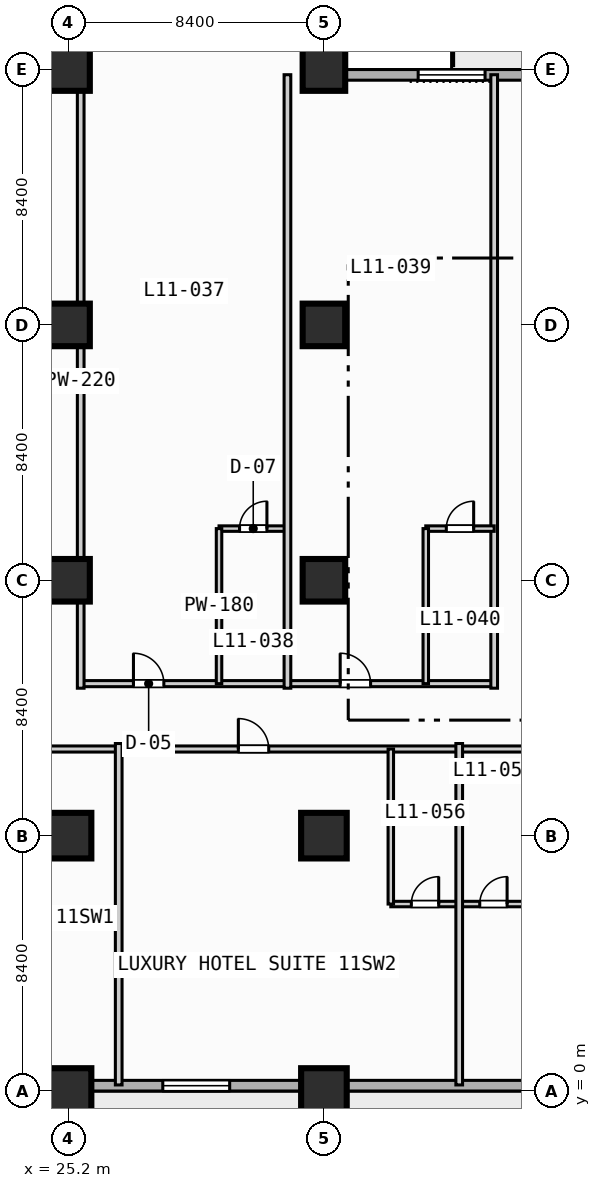
"""IFC4 building model, lengths in metres.
Left out: names, types, materials, properties, quantities, classifications, styles, units other than length and angle.
Written with IfcOpenShell. Run it as: python <this file> out.ifc"""

import sys

from ifc_helpers import new_model, si_unit, direction, frame, frame_2d, origin, origin_2d, place, context, subcontext, project, spatial, rectangle, extrude, element, fill, save


model = new_model("IFC4")
c1 = context("Model", 3, precision=1e-05, world=origin(), true_north=direction((0.0, 1.0)))
c2 = subcontext(c1, "Body", "Model", "MODEL_VIEW")
j1 = project(units=[si_unit("LENGTHUNIT", "METRE"), si_unit("PLANEANGLEUNIT", "RADIAN")], contexts=[c1])
p1 = place(None, origin())
s1 = spatial("IfcSite", under=j1, at=p1, CompositionType="ELEMENT")
p2 = place(p1, origin())
s2 = spatial("IfcBuilding", under=s1, at=p2, CompositionType="ELEMENT")
p3 = place(p2, frame((0.0, 0.0, 51.0)))
s3 = spatial("IfcBuildingStorey", under=s2, at=p3, CompositionType="ELEMENT", Elevation=51.0)
for number, where, z_axis, x_axis in (
    (1, (25.2, 0.0, 0.0), (0.0, 0.0, 1.0), (1.0, 0.0, 0.0)),
    (2, (25.2, 8.4, 0.0), (0.0, 0.0, 1.0), (1.0, 0.0, 0.0)),
):
    element("IfcColumn", number, at=place(p3, frame(where, z_axis=z_axis, x_axis=x_axis)), inside=s3, PredefinedType="COLUMN", context=c2, shape_type="SweptSolid", body=[
        extrude(rectangle(XDim=1.5, YDim=1.5, at=origin_2d()), origin(), (0.0, 0.0, 1.0), 3.8),
    ])
for number, where, z_axis, x_axis in (
    (3, (25.2, 16.8, 0.0), (0.0, 0.0, 1.0), (1.0, 0.0, 0.0)),
    (4, (25.2, 25.2, 0.0), (0.0, 0.0, 1.0), (1.0, 0.0, 0.0)),
    (5, (25.2, 33.6, 0.0), (0.0, 0.0, 1.0), (1.0, 0.0, 0.0)),
):
    element("IfcColumn", number, at=place(p3, frame(where, z_axis=z_axis, x_axis=x_axis)), inside=s3, PredefinedType="COLUMN", context=c2, shape_type="SweptSolid", body=[
        extrude(rectangle(XDim=1.4, YDim=1.4, at=origin_2d()), origin(), (0.0, 0.0, 1.0), 3.8),
    ])
for number, where, z_axis, x_axis in (
    (6, (33.6, 0.0, 0.0), (0.0, 0.0, 1.0), (1.0, 0.0, 0.0)),
    (7, (33.6, 8.4, 0.0), (0.0, 0.0, 1.0), (1.0, 0.0, 0.0)),
):
    element("IfcColumn", number, at=place(p3, frame(where, z_axis=z_axis, x_axis=x_axis)), inside=s3, PredefinedType="COLUMN", context=c2, shape_type="SweptSolid", body=[
        extrude(rectangle(XDim=1.5, YDim=1.5, at=origin_2d()), origin(), (0.0, 0.0, 1.0), 3.8),
    ])
for number, where, z_axis, x_axis in (
    (8, (33.6, 16.8, 0.0), (0.0, 0.0, 1.0), (1.0, 0.0, 0.0)),
    (9, (33.6, 25.2, 0.0), (0.0, 0.0, 1.0), (1.0, 0.0, 0.0)),
    (10, (33.6, 33.6, 0.0), (0.0, 0.0, 1.0), (1.0, 0.0, 0.0)),
):
    element("IfcColumn", number, at=place(p3, frame(where, z_axis=z_axis, x_axis=x_axis)), inside=s3, PredefinedType="COLUMN", context=c2, shape_type="SweptSolid", body=[
        extrude(rectangle(XDim=1.4, YDim=1.4, at=origin_2d()), origin(), (0.0, 0.0, 1.0), 3.8),
    ])
p4 = place(p3, frame((33.425, 89.225, 0.0), z_axis=(0.0, 0.0, 1.0), x_axis=(0.0, -1.0, 0.0)))
e11 = element("IfcWall", 11, at=p4, inside=s3, PredefinedType="STANDARD", context=c2, shape_type="SweptSolid", body=[
    extrude(rectangle(XDim=55.8, YDim=0.35, at=frame_2d((27.9, 0.0))), origin(), (0.0, 0.0, 1.0), 3.55),
])
p5 = place(p4, frame((16.725, 0.0, 0.85)))
e12 = element("IfcOpeningElement", 12, at=p5, cuts=e11, PredefinedType="OPENING", context=c2, shape_type="SweptSolid", body=[
    extrude(rectangle(XDim=2.2, YDim=1.8, at=frame_2d((1.1, 0.9))), frame((0.0, 0.185, 0.0), z_axis=(0.0, -1.0, 0.0), x_axis=(1.0, 0.0, 0.0)), (0.0, 0.0, 1.0), 0.37),
])
p6 = place(p4, frame((8.325, 0.0, 0.85)))
e13 = element("IfcOpeningElement", 13, at=p6, cuts=e11, PredefinedType="OPENING", context=c2, shape_type="SweptSolid", body=[
    extrude(rectangle(XDim=2.2, YDim=1.8, at=frame_2d((1.1, 0.9))), frame((0.0, 0.185, 0.0), z_axis=(0.0, -1.0, 0.0), x_axis=(1.0, 0.0, 0.0)), (0.0, 0.0, 1.0), 0.37),
])
p7 = place(p3, frame((33.425, 33.425, 0.0), z_axis=(0.0, 0.0, 1.0), x_axis=(1.0, 0.0, 0.0)))
e14 = element("IfcWall", 14, at=p7, inside=s3, PredefinedType="STANDARD", context=c2, shape_type="SweptSolid", body=[
    extrude(rectangle(XDim=55.8, YDim=0.35, at=frame_2d((27.9, 0.0))), origin(), (0.0, 0.0, 1.0), 3.55),
])
p8 = place(p7, frame((12.075, 0.0, 0.0)))
e15 = element("IfcOpeningElement", 15, at=p8, cuts=e14, PredefinedType="OPENING", context=c2, shape_type="SweptSolid", body=[
    extrude(rectangle(XDim=1.4, YDim=2.2, at=frame_2d((0.7, 1.1))), frame((0.0, 0.185, 0.0), z_axis=(0.0, -1.0, 0.0), x_axis=(1.0, 0.0, 0.0)), (0.0, 0.0, 1.0), 0.37),
])
p9 = place(p7, frame((3.275, 0.0, 0.85)))
e16 = element("IfcOpeningElement", 16, at=p9, cuts=e14, PredefinedType="OPENING", context=c2, shape_type="SweptSolid", body=[
    extrude(rectangle(XDim=2.2, YDim=1.8, at=frame_2d((1.1, 0.9))), frame((0.0, 0.185, 0.0), z_axis=(0.0, -1.0, 0.0), x_axis=(1.0, 0.0, 0.0)), (0.0, 0.0, 1.0), 0.37),
])
p10 = place(p3, frame((89.225, 0.175, 0.0), z_axis=(0.0, 0.0, 1.0), x_axis=(-1.0, 0.0, 0.0)))
e17 = element("IfcWall", 17, at=p10, inside=s3, PredefinedType="STANDARD", context=c2, shape_type="SweptSolid", body=[
    extrude(rectangle(XDim=86.05, YDim=0.35, at=frame_2d((43.025, 0.0))), origin(), (0.0, 0.0, 1.0), 3.55),
])
p11 = place(p10, frame((67.525, 0.0, 0.0)))
e18 = element("IfcOpeningElement", 18, at=p11, cuts=e17, PredefinedType="OPENING", context=c2, shape_type="SweptSolid", body=[
    extrude(rectangle(XDim=1.4, YDim=2.2, at=frame_2d((0.7, 1.1))), frame((0.0, 0.185, 0.0), z_axis=(0.0, -1.0, 0.0), x_axis=(1.0, 0.0, 0.0)), (0.0, 0.0, 1.0), 0.37),
])
p12 = place(p10, frame((58.725, 0.0, 0.85)))
e19 = element("IfcOpeningElement", 19, at=p12, cuts=e17, PredefinedType="OPENING", context=c2, shape_type="SweptSolid", body=[
    extrude(rectangle(XDim=2.2, YDim=1.8, at=frame_2d((1.1, 0.9))), frame((0.0, 0.185, 0.0), z_axis=(0.0, -1.0, 0.0), x_axis=(1.0, 0.0, 0.0)), (0.0, 0.0, 1.0), 0.37),
])
p13 = place(p10, frame((41.925, 0.0, 0.85)))
e20 = element("IfcOpeningElement", 20, at=p13, cuts=e17, PredefinedType="OPENING", context=c2, shape_type="SweptSolid", body=[
    extrude(rectangle(XDim=2.2, YDim=1.8, at=frame_2d((1.1, 0.9))), frame((0.0, 0.185, 0.0), z_axis=(0.0, -1.0, 0.0), x_axis=(1.0, 0.0, 0.0)), (0.0, 0.0, 1.0), 0.37),
])
p14 = place(p10, frame((33.525, 0.0, 0.85)))
e21 = element("IfcOpeningElement", 21, at=p14, cuts=e17, PredefinedType="OPENING", context=c2, shape_type="SweptSolid", body=[
    extrude(rectangle(XDim=2.2, YDim=1.8, at=frame_2d((1.1, 0.9))), frame((0.0, 0.185, 0.0), z_axis=(0.0, -1.0, 0.0), x_axis=(1.0, 0.0, 0.0)), (0.0, 0.0, 1.0), 0.37),
])
p15 = place(p10, frame((16.725, 0.0, 0.85)))
e22 = element("IfcOpeningElement", 22, at=p15, cuts=e17, PredefinedType="OPENING", context=c2, shape_type="SweptSolid", body=[
    extrude(rectangle(XDim=2.2, YDim=1.8, at=frame_2d((1.1, 0.9))), frame((0.0, 0.185, 0.0), z_axis=(0.0, -1.0, 0.0), x_axis=(1.0, 0.0, 0.0)), (0.0, 0.0, 1.0), 0.37),
])
p16 = place(p10, frame((8.325, 0.0, 0.85)))
e23 = element("IfcOpeningElement", 23, at=p16, cuts=e17, PredefinedType="OPENING", context=c2, shape_type="SweptSolid", body=[
    extrude(rectangle(XDim=2.2, YDim=1.8, at=frame_2d((1.1, 0.9))), frame((0.0, 0.185, 0.0), z_axis=(0.0, -1.0, 0.0), x_axis=(1.0, 0.0, 0.0)), (0.0, 0.0, 1.0), 0.37),
])
p17 = place(p3, frame((25.6, 13.4, 0.0), z_axis=(0.0, 0.0, 1.0), x_axis=(1.0, 0.0, 0.0)))
e24 = element("IfcWall", 24, at=p17, inside=s3, PredefinedType="PARTITIONING", context=c2, shape_type="SweptSolid", body=[
    extrude(rectangle(XDim=13.6, YDim=0.2, at=frame_2d((6.8, 0.0))), origin(), (0.0, 0.0, 1.0), 3.55),
])
p18 = place(p17, frame((1.735, 0.0, 0.0)))
e25 = element("IfcOpeningElement", 25, at=p18, cuts=e24, PredefinedType="OPENING", context=c2, shape_type="SweptSolid", body=[
    extrude(rectangle(XDim=1.0, YDim=2.15, at=frame_2d((0.5, 1.075))), frame((0.0, 0.11, 0.0), z_axis=(0.0, -1.0, 0.0), x_axis=(1.0, 0.0, 0.0)), (0.0, 0.0, 1.0), 0.22),
])
p19 = place(p17, frame((8.535, 0.0, 0.0)))
e26 = element("IfcOpeningElement", 26, at=p19, cuts=e24, PredefinedType="OPENING", context=c2, shape_type="SweptSolid", body=[
    extrude(rectangle(XDim=1.0, YDim=2.15, at=frame_2d((0.5, 1.075))), frame((0.0, 0.11, 0.0), z_axis=(0.0, -1.0, 0.0), x_axis=(1.0, 0.0, 0.0)), (0.0, 0.0, 1.0), 0.22),
])
p20 = place(p3, frame((25.6, 13.25, 0.0), z_axis=(0.0, 0.0, 1.0), x_axis=(0.0, 1.0, 0.0)))
e27 = element("IfcWall", 27, at=p20, inside=s3, PredefinedType="PARTITIONING", context=c2, shape_type="SweptSolid", body=[
    extrude(rectangle(XDim=20.18, YDim=0.22, at=frame_2d((10.09, 0.0))), origin(), (0.0, 0.0, 1.0), 3.55),
])
p21 = place(p3, frame((30.15, 18.5, 0.0), z_axis=(0.0, 0.0, 1.0), x_axis=(1.0, 0.0, 0.0)))
e28 = element("IfcWall", 28, at=p21, inside=s3, PredefinedType="PLUMBINGWALL", context=c2, shape_type="SweptSolid", body=[
    extrude(rectangle(XDim=2.25, YDim=0.18, at=frame_2d((1.125, 0.0))), origin(), (0.0, 0.0, 1.0), 3.55),
])
p22 = place(p21, frame((0.675, 0.0, 0.0)))
e29 = element("IfcOpeningElement", 29, at=p22, cuts=e28, PredefinedType="OPENING", context=c2, shape_type="SweptSolid", body=[
    extrude(rectangle(XDim=0.9, YDim=2.1, at=frame_2d((0.45, 1.05))), frame((0.0, 0.1, 0.0), z_axis=(0.0, -1.0, 0.0), x_axis=(1.0, 0.0, 0.0)), (0.0, 0.0, 1.0), 0.2),
])
p23 = place(p3, frame((30.15, 13.4, 0.0), z_axis=(0.0, 0.0, 1.0), x_axis=(0.0, 1.0, 0.0)))
e30 = element("IfcWall", 30, at=p23, inside=s3, PredefinedType="PLUMBINGWALL", context=c2, shape_type="SweptSolid", body=[
    extrude(rectangle(XDim=5.1, YDim=0.18, at=frame_2d((2.55, 0.0))), origin(), (0.0, 0.0, 1.0), 3.55),
])
for number, where, z_axis, x_axis in (
    (31, (32.4, 13.25, 0.0), (0.0, 0.0, 1.0), (0.0, 1.0, 0.0)),
    (32, (39.2, 13.25, 0.0), (0.0, 0.0, 1.0), (0.0, 1.0, 0.0)),
):
    element("IfcWall", number, at=place(p3, frame(where, z_axis=z_axis, x_axis=x_axis)), inside=s3, PredefinedType="PARTITIONING", context=c2, shape_type="SweptSolid", body=[
        extrude(rectangle(XDim=20.18, YDim=0.22, at=frame_2d((10.09, 0.0))), origin(), (0.0, 0.0, 1.0), 3.55),
    ])
p24 = place(p3, frame((36.95, 18.5, 0.0), z_axis=(0.0, 0.0, 1.0), x_axis=(1.0, 0.0, 0.0)))
e33 = element("IfcWall", 33, at=p24, inside=s3, PredefinedType="PLUMBINGWALL", context=c2, shape_type="SweptSolid", body=[
    extrude(rectangle(XDim=2.25, YDim=0.18, at=frame_2d((1.125, 0.0))), origin(), (0.0, 0.0, 1.0), 3.55),
])
p25 = place(p24, frame((0.675, 0.0, 0.0)))
e34 = element("IfcOpeningElement", 34, at=p25, cuts=e33, PredefinedType="OPENING", context=c2, shape_type="SweptSolid", body=[
    extrude(rectangle(XDim=0.9, YDim=2.1, at=frame_2d((0.45, 1.05))), frame((0.0, 0.1, 0.0), z_axis=(0.0, -1.0, 0.0), x_axis=(1.0, 0.0, 0.0)), (0.0, 0.0, 1.0), 0.2),
])
p26 = place(p3, frame((36.95, 13.4, 0.0), z_axis=(0.0, 0.0, 1.0), x_axis=(0.0, 1.0, 0.0)))
e35 = element("IfcWall", 35, at=p26, inside=s3, PredefinedType="PLUMBINGWALL", context=c2, shape_type="SweptSolid", body=[
    extrude(rectangle(XDim=5.1, YDim=0.18, at=frame_2d((2.55, 0.0))), origin(), (0.0, 0.0, 1.0), 3.55),
])
p27 = place(p3, frame((13.65, 11.25, 0.0), z_axis=(0.0, 0.0, 1.0), x_axis=(1.0, 0.0, 0.0)))
e36 = element("IfcWall", 36, at=p27, inside=s3, PredefinedType="PARTITIONING", context=c2, shape_type="SweptSolid", body=[
    extrude(rectangle(XDim=75.15, YDim=0.2, at=frame_2d((37.575, 0.0))), origin(), (0.0, 0.0, 1.0), 3.55),
])
p28 = place(p27, frame((7.265, 0.0, 0.0)))
e37 = element("IfcOpeningElement", 37, at=p28, cuts=e36, PredefinedType="OPENING", context=c2, shape_type="SweptSolid", body=[
    extrude(rectangle(XDim=1.0, YDim=2.15, at=frame_2d((0.5, 1.075))), frame((0.0, 0.11, 0.0), z_axis=(0.0, -1.0, 0.0), x_axis=(1.0, 0.0, 0.0)), (0.0, 0.0, 1.0), 0.22),
])
p29 = place(p27, frame((17.135, 0.0, 0.0)))
e38 = element("IfcOpeningElement", 38, at=p29, cuts=e36, PredefinedType="OPENING", context=c2, shape_type="SweptSolid", body=[
    extrude(rectangle(XDim=1.0, YDim=2.15, at=frame_2d((0.5, 1.075))), frame((0.0, 0.11, 0.0), z_axis=(0.0, -1.0, 0.0), x_axis=(1.0, 0.0, 0.0)), (0.0, 0.0, 1.0), 0.22),
])
p30 = place(p27, frame((31.665, 0.0, 0.0)))
e39 = element("IfcOpeningElement", 39, at=p30, cuts=e36, PredefinedType="OPENING", context=c2, shape_type="SweptSolid", body=[
    extrude(rectangle(XDim=1.0, YDim=2.15, at=frame_2d((0.5, 1.075))), frame((0.0, 0.11, 0.0), z_axis=(0.0, -1.0, 0.0), x_axis=(1.0, 0.0, 0.0)), (0.0, 0.0, 1.0), 0.22),
])
p31 = place(p27, frame((41.535, 0.0, 0.0)))
e40 = element("IfcOpeningElement", 40, at=p31, cuts=e36, PredefinedType="OPENING", context=c2, shape_type="SweptSolid", body=[
    extrude(rectangle(XDim=1.0, YDim=2.15, at=frame_2d((0.5, 1.075))), frame((0.0, 0.11, 0.0), z_axis=(0.0, -1.0, 0.0), x_axis=(1.0, 0.0, 0.0)), (0.0, 0.0, 1.0), 0.22),
])
p32 = place(p27, frame((56.065, 0.0, 0.0)))
e41 = element("IfcOpeningElement", 41, at=p32, cuts=e36, PredefinedType="OPENING", context=c2, shape_type="SweptSolid", body=[
    extrude(rectangle(XDim=1.0, YDim=2.15, at=frame_2d((0.5, 1.075))), frame((0.0, 0.11, 0.0), z_axis=(0.0, -1.0, 0.0), x_axis=(1.0, 0.0, 0.0)), (0.0, 0.0, 1.0), 0.22),
])
p33 = place(p27, frame((66.91, 0.0, 0.0)))
e42 = element("IfcOpeningElement", 42, at=p33, cuts=e36, PredefinedType="OPENING", context=c2, shape_type="SweptSolid", body=[
    extrude(rectangle(XDim=1.0, YDim=2.15, at=frame_2d((0.5, 1.075))), frame((0.0, 0.11, 0.0), z_axis=(0.0, -1.0, 0.0), x_axis=(1.0, 0.0, 0.0)), (0.0, 0.0, 1.0), 0.22),
])
p34 = place(p3, frame((26.85, 0.2, 0.0), z_axis=(0.0, 0.0, 1.0), x_axis=(0.0, 1.0, 0.0)))
e43 = element("IfcWall", 43, at=p34, inside=s3, PredefinedType="PARTITIONING", context=c2, shape_type="SweptSolid", body=[
    extrude(rectangle(XDim=11.23, YDim=0.22, at=frame_2d((5.615, 0.0))), origin(), (0.0, 0.0, 1.0), 3.55),
])
p35 = place(p3, frame((35.8, 6.15, 0.0), z_axis=(0.0, 0.0, 1.0), x_axis=(1.0, 0.0, 0.0)))
e44 = element("IfcWall", 44, at=p35, inside=s3, PredefinedType="PLUMBINGWALL", context=c2, shape_type="SweptSolid", body=[
    extrude(rectangle(XDim=4.5, YDim=0.18, at=frame_2d((2.25, 0.0))), origin(), (0.0, 0.0, 1.0), 3.55),
])
p36 = place(p35, frame((0.675, 0.0, 0.0)))
e45 = element("IfcOpeningElement", 45, at=p36, cuts=e44, PredefinedType="OPENING", context=c2, shape_type="SweptSolid", body=[
    extrude(rectangle(XDim=0.9, YDim=2.1, at=frame_2d((0.45, 1.05))), frame((0.0, 0.1, 0.0), z_axis=(0.0, -1.0, 0.0), x_axis=(1.0, 0.0, 0.0)), (0.0, 0.0, 1.0), 0.2),
])
p37 = place(p35, frame((2.925, 0.0, 0.0)))
e46 = element("IfcOpeningElement", 46, at=p37, cuts=e44, PredefinedType="OPENING", context=c2, shape_type="SweptSolid", body=[
    extrude(rectangle(XDim=0.9, YDim=2.1, at=frame_2d((0.45, 1.05))), frame((0.0, 0.1, 0.0), z_axis=(0.0, -1.0, 0.0), x_axis=(1.0, 0.0, 0.0)), (0.0, 0.0, 1.0), 0.2),
])
p38 = place(p3, frame((35.8, 6.15, 0.0), z_axis=(0.0, 0.0, 1.0), x_axis=(0.0, 1.0, 0.0)))
e47 = element("IfcWall", 47, at=p38, inside=s3, PredefinedType="PLUMBINGWALL", context=c2, shape_type="SweptSolid", body=[
    extrude(rectangle(XDim=5.1, YDim=0.18, at=frame_2d((2.55, 0.0))), origin(), (0.0, 0.0, 1.0), 3.55),
])
p39 = place(p3, frame((38.05, 0.2, 0.0), z_axis=(0.0, 0.0, 1.0), x_axis=(0.0, 1.0, 0.0)))
e48 = element("IfcWall", 48, at=p39, inside=s3, PredefinedType="PARTITIONING", context=c2, shape_type="SweptSolid", body=[
    extrude(rectangle(XDim=11.23, YDim=0.22, at=frame_2d((5.615, 0.0))), origin(), (0.0, 0.0, 1.0), 3.55),
])
p40 = place(p9, origin())
e49 = element("IfcWindow", 49, at=p40, inside=s3, PartitioningType="SINGLE_PANEL", PredefinedType="WINDOW", context=c2, shape_type="SweptSolid", body=[
    extrude(rectangle(XDim=2.2, YDim=1.8, at=frame_2d((1.1, 0.9))), frame((0.0, 0.03, 0.0), z_axis=(0.0, -1.0, 0.0), x_axis=(1.0, 0.0, 0.0)), (0.0, 0.0, 1.0), 0.06),
])
fill(e16, e49)
p41 = place(p12, origin())
e50 = element("IfcWindow", 50, at=p41, inside=s3, PartitioningType="SINGLE_PANEL", PredefinedType="WINDOW", context=c2, shape_type="SweptSolid", body=[
    extrude(rectangle(XDim=2.2, YDim=1.8, at=frame_2d((1.1, 0.9))), frame((0.0, 0.03, 0.0), z_axis=(0.0, -1.0, 0.0), x_axis=(1.0, 0.0, 0.0)), (0.0, 0.0, 1.0), 0.06),
])
fill(e19, e50)
p42 = place(p18, origin())
e51 = element("IfcDoor", 51, at=p42, inside=s3, OperationType="SINGLE_SWING_LEFT", PredefinedType="DOOR", context=c2, shape_type="SweptSolid", body=[
    extrude(rectangle(XDim=1.0, YDim=2.15, at=frame_2d((0.5, 1.075))), frame((0.0, 0.025, 0.0), z_axis=(0.0, -1.0, 0.0), x_axis=(1.0, 0.0, 0.0)), (0.0, 0.0, 1.0), 0.05),
])
fill(e25, e51)
p43 = place(p19, origin())
e52 = element("IfcDoor", 52, at=p43, inside=s3, OperationType="SINGLE_SWING_LEFT", PredefinedType="DOOR", context=c2, shape_type="SweptSolid", body=[
    extrude(rectangle(XDim=1.0, YDim=2.15, at=frame_2d((0.5, 1.075))), frame((0.0, 0.025, 0.0), z_axis=(0.0, -1.0, 0.0), x_axis=(1.0, 0.0, 0.0)), (0.0, 0.0, 1.0), 0.05),
])
fill(e26, e52)
p44 = place(p22, origin())
e53 = element("IfcDoor", 53, at=p44, inside=s3, OperationType="SINGLE_SWING_RIGHT", PredefinedType="DOOR", context=c2, shape_type="SweptSolid", body=[
    extrude(rectangle(XDim=0.9, YDim=2.1, at=frame_2d((0.45, 1.05))), frame((0.0, 0.025, 0.0), z_axis=(0.0, -1.0, 0.0), x_axis=(1.0, 0.0, 0.0)), (0.0, 0.0, 1.0), 0.05),
])
fill(e29, e53)
p45 = place(p25, origin())
e54 = element("IfcDoor", 54, at=p45, inside=s3, OperationType="SINGLE_SWING_RIGHT", PredefinedType="DOOR", context=c2, shape_type="SweptSolid", body=[
    extrude(rectangle(XDim=0.9, YDim=2.1, at=frame_2d((0.45, 1.05))), frame((0.0, 0.025, 0.0), z_axis=(0.0, -1.0, 0.0), x_axis=(1.0, 0.0, 0.0)), (0.0, 0.0, 1.0), 0.05),
])
fill(e34, e54)
p46 = place(p29, origin())
e55 = element("IfcDoor", 55, at=p46, inside=s3, OperationType="SINGLE_SWING_LEFT", PredefinedType="DOOR", context=c2, shape_type="SweptSolid", body=[
    extrude(rectangle(XDim=1.0, YDim=2.15, at=frame_2d((0.5, 1.075))), frame((0.0, 0.025, 0.0), z_axis=(0.0, -1.0, 0.0), x_axis=(1.0, 0.0, 0.0)), (0.0, 0.0, 1.0), 0.05),
])
fill(e38, e55)
p47 = place(p36, origin())
e56 = element("IfcDoor", 56, at=p47, inside=s3, OperationType="SINGLE_SWING_RIGHT", PredefinedType="DOOR", context=c2, shape_type="SweptSolid", body=[
    extrude(rectangle(XDim=0.9, YDim=2.1, at=frame_2d((0.45, 1.05))), frame((0.0, 0.025, 0.0), z_axis=(0.0, -1.0, 0.0), x_axis=(1.0, 0.0, 0.0)), (0.0, 0.0, 1.0), 0.05),
])
fill(e45, e56)
p48 = place(p37, origin())
e57 = element("IfcDoor", 57, at=p48, inside=s3, OperationType="SINGLE_SWING_RIGHT", PredefinedType="DOOR", context=c2, shape_type="SweptSolid", body=[
    extrude(rectangle(XDim=0.9, YDim=2.1, at=frame_2d((0.45, 1.05))), frame((0.0, 0.025, 0.0), z_axis=(0.0, -1.0, 0.0), x_axis=(1.0, 0.0, 0.0)), (0.0, 0.0, 1.0), 0.05),
])
fill(e46, e57)
save(model, sys.argv[1])
